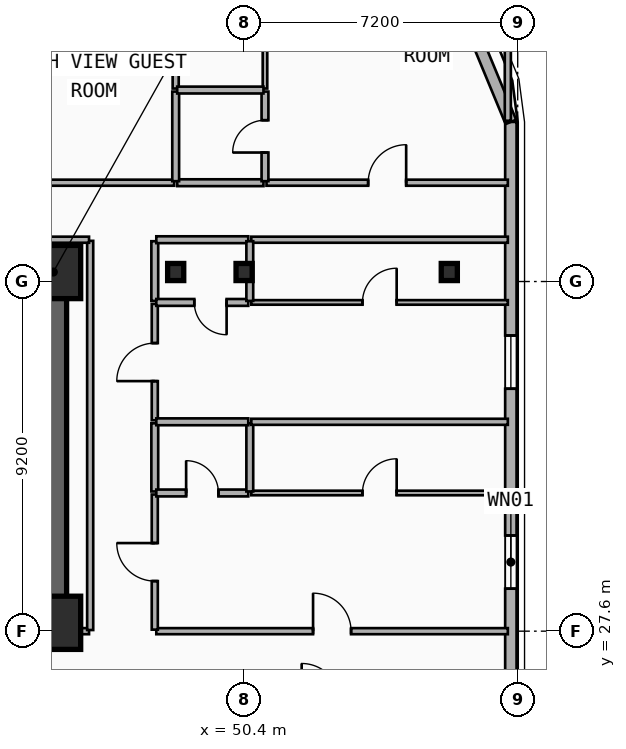
"""IFC4 building model, lengths in metres.
Left out: names, types, materials, properties, quantities, classifications, styles, units other than length and angle.
Written with IfcOpenShell. Run it as: python <this file> out.ifc"""

import sys

from ifc_helpers import new_model, si_unit, direction, frame, frame_2d, origin, origin_2d, place, context, subcontext, project, spatial, rectangle, i_section, extrude, element, fill, save


model = new_model("IFC4")
c1 = context("Model", 3, precision=1e-05, world=origin(), true_north=direction((0.0, 1.0)))
c2 = subcontext(c1, "Body", "Model", "MODEL_VIEW")
j1 = project(units=[si_unit("LENGTHUNIT", "METRE"), si_unit("PLANEANGLEUNIT", "RADIAN")], contexts=[c1])
p1 = place(None, origin())
s1 = spatial("IfcSite", under=j1, at=p1, CompositionType="ELEMENT")
p2 = place(p1, origin())
s2 = spatial("IfcBuilding", under=s1, at=p2, CompositionType="ELEMENT")
p3 = place(p2, frame((0.0, 0.0, 53.5)))
s3 = spatial("IfcBuildingStorey", under=s2, at=p3, CompositionType="ELEMENT", Elevation=53.5)
p4 = place(p3, frame((12.15, 37.05, 0.0), z_axis=(0.0, 0.0, 1.0), x_axis=(1.0, 0.0, 0.0)))
e1 = element("IfcWall", 1, at=p4, inside=s3, PredefinedType="SHEAR", context=c2, shape_type="SweptSolid", body=[
    extrude(rectangle(XDim=33.23, YDim=0.7, at=frame_2d((16.615, 0.0))), origin(), (0.0, 0.0, 1.0), 3.5),
])
p5 = place(p3, frame((45.38, 27.82, 0.0), z_axis=(0.0, 0.0, 1.0), x_axis=(-1.0, 0.0, 0.0)))
e2 = element("IfcWall", 2, at=p5, inside=s3, PredefinedType="SHEAR", context=c2, shape_type="SweptSolid", body=[
    extrude(rectangle(XDim=12.23, YDim=0.7, at=frame_2d((6.115, 0.0))), origin(), (0.0, 0.0, 1.0), 3.5),
])
p6 = place(p5, frame((9.93, 0.0, 0.0)))
e3 = element("IfcOpeningElement", 3, at=p6, cuts=e2, PredefinedType="OPENING", context=c2, shape_type="SweptSolid", body=[
    extrude(rectangle(XDim=1.1, YDim=2.15, at=frame_2d((0.55, 1.075))), frame((0.0, 0.36, 0.0), z_axis=(0.0, -1.0, 0.0), x_axis=(1.0, 0.0, 0.0)), (0.0, 0.0, 1.0), 0.72),
])
p7 = place(p5, frame((6.23, 0.0, 0.0)))
e4 = element("IfcOpeningElement", 4, at=p7, cuts=e2, PredefinedType="OPENING", context=c2, shape_type="SweptSolid", body=[
    extrude(rectangle(XDim=1.1, YDim=2.15, at=frame_2d((0.55, 1.075))), frame((0.0, 0.36, 0.0), z_axis=(0.0, -1.0, 0.0), x_axis=(1.0, 0.0, 0.0)), (0.0, 0.0, 1.0), 0.72),
])
p8 = place(p3, frame((45.38, 28.17, 0.0), z_axis=(0.0, 0.0, 1.0), x_axis=(0.0, 1.0, 0.0)))
e5 = element("IfcWall", 5, at=p8, inside=s3, PredefinedType="SHEAR", context=c2, shape_type="SweptSolid", body=[
    extrude(rectangle(XDim=8.53, YDim=0.7, at=frame_2d((4.265, 0.0))), origin(), (0.0, 0.0, 1.0), 3.5),
])
for number, where, z_axis, x_axis in (
    (6, (45.4, 27.82, 0.0), (0.0, 0.0, 1.0), (1.0, 0.0, 0.0)),
    (7, (45.4, 37.05, 0.0), (0.0, 0.0, 1.0), (1.0, 0.0, 0.0)),
):
    element("IfcColumn", number, at=place(p3, frame(where, z_axis=z_axis, x_axis=x_axis)), inside=s3, PredefinedType="COLUMN", context=c2, shape_type="SweptSolid", body=[
        extrude(rectangle(XDim=1.4, YDim=1.4, at=origin_2d()), origin(), (0.0, 0.0, 1.0), 3.5),
    ])
for number, where, z_axis, x_axis in (
    (8, (48.6, 37.05, 0.0), (0.0, 0.0, 1.0), (1.0, 0.0, 0.0)),
    (9, (50.4, 37.05, 0.0), (0.0, 0.0, 1.0), (1.0, 0.0, 0.0)),
    (10, (55.8, 37.05, 0.0), (0.0, 0.0, 1.0), (1.0, 0.0, 0.0)),
):
    element("IfcColumn", number, at=place(p3, frame(where, z_axis=z_axis, x_axis=x_axis)), inside=s3, PredefinedType="COLUMN", context=c2, shape_type="SweptSolid", body=[
        extrude(i_section(OverallWidth=0.424, OverallDepth=0.45, WebThickness=0.041, FlangeThickness=0.065, FilletRadius=0.015, at=origin_2d()), origin(), (0.0, 0.0, 1.0), 3.5),
    ])
p9 = place(p3, frame((57.42, 41.0, 0.0), z_axis=(0.0, 0.0, 1.0), x_axis=(0.0, -1.0, 0.0)))
e11 = element("IfcWall", 11, at=p9, inside=s3, PredefinedType="SOLIDWALL", context=c2, shape_type="SweptSolid", body=[
    extrude(rectangle(XDim=15.2, YDim=0.3, at=frame_2d((7.6, 0.0))), origin(), (0.0, 0.0, 1.0), 3.24),
])
p10 = place(p9, frame((10.882, 0.0, 0.48)))
e12 = element("IfcOpeningElement", 12, at=p10, cuts=e11, PredefinedType="OPENING", context=c2, shape_type="SweptSolid", body=[
    extrude(rectangle(XDim=1.4, YDim=1.8, at=frame_2d((0.7, 0.9))), frame((0.0, 0.16, 0.0), z_axis=(0.0, -1.0, 0.0), x_axis=(1.0, 0.0, 0.0)), (0.0, 0.0, 1.0), 0.32),
])
p11 = place(p9, frame((5.621, 0.0, 0.48)))
e13 = element("IfcOpeningElement", 13, at=p11, cuts=e11, PredefinedType="OPENING", context=c2, shape_type="SweptSolid", body=[
    extrude(rectangle(XDim=1.4, YDim=1.8, at=frame_2d((0.7, 0.9))), frame((0.0, 0.16, 0.0), z_axis=(0.0, -1.0, 0.0), x_axis=(1.0, 0.0, 0.0)), (0.0, 0.0, 1.0), 0.32),
])
p12 = place(p3, frame((56.243, 43.843, 0.0), z_axis=(0.0, 0.0, 1.0), x_axis=(0.382636798336, -0.92389884758, 0.0)))
e14 = element("IfcWall", 14, at=p12, inside=s3, PredefinedType="SOLIDWALL", context=c2, shape_type="SweptSolid", body=[
    extrude(rectangle(XDim=3.077, YDim=0.3, at=frame_2d((1.538, 0.0))), origin(), (0.0, 0.0, 1.0), 3.24),
])
p13 = place(p3, frame((48.09, 27.6, 0.0), z_axis=(0.0, 0.0, 1.0), x_axis=(1.0, 0.0, 0.0)))
e15 = element("IfcWall", 15, at=p13, inside=s3, PredefinedType="PARTITIONING", context=c2, shape_type="SweptSolid", body=[
    extrude(rectangle(XDim=9.25, YDim=0.16, at=frame_2d((4.625, 0.0))), origin(), (0.0, 0.0, 1.0), 2.57),
])
p14 = place(p13, frame((4.125, 0.0, 0.0)))
e16 = element("IfcOpeningElement", 16, at=p14, cuts=e15, PredefinedType="OPENING", context=c2, shape_type="SweptSolid", body=[
    extrude(rectangle(XDim=1.0, YDim=2.15, at=frame_2d((0.5, 1.075))), frame((0.0, 0.09, 0.0), z_axis=(0.0, -1.0, 0.0), x_axis=(1.0, 0.0, 0.0)), (0.0, 0.0, 1.0), 0.18),
])
p15 = place(p3, frame((48.05, 27.64, 0.0), z_axis=(0.0, 0.0, 1.0), x_axis=(0.0, 1.0, 0.0)))
e17 = element("IfcWall", 17, at=p15, inside=s3, PredefinedType="PARTITIONING", context=c2, shape_type="SweptSolid", body=[
    extrude(rectangle(XDim=3.556, YDim=0.16, at=frame_2d((1.778, 0.0))), origin(), (0.0, 0.0, 1.0), 3.24),
])
p16 = place(p15, frame((1.278, 0.0, 0.0)))
e18 = element("IfcOpeningElement", 18, at=p16, cuts=e17, PredefinedType="OPENING", context=c2, shape_type="SweptSolid", body=[
    extrude(rectangle(XDim=1.0, YDim=2.15, at=frame_2d((0.5, 1.075))), frame((0.0, 0.09, 0.0), z_axis=(0.0, -1.0, 0.0), x_axis=(1.0, 0.0, 0.0)), (0.0, 0.0, 1.0), 0.18),
])
p17 = place(p3, frame((48.05, 31.276, 0.0), z_axis=(0.0, 0.0, 1.0), x_axis=(0.0, 1.0, 0.0)))
e19 = element("IfcWall", 19, at=p17, inside=s3, PredefinedType="PLUMBINGWALL", context=c2, shape_type="SweptSolid", body=[
    extrude(rectangle(XDim=1.793, YDim=0.18, at=frame_2d((0.896, 0.0))), origin(), (0.0, 0.0, 1.0), 3.24),
])
p18 = place(p3, frame((48.05, 33.149, 0.0), z_axis=(0.0, 0.0, 1.0), x_axis=(0.0, 1.0, 0.0)))
e20 = element("IfcWall", 20, at=p18, inside=s3, PredefinedType="PARTITIONING", context=c2, shape_type="SweptSolid", body=[
    extrude(rectangle(XDim=3.061, YDim=0.16, at=frame_2d((1.531, 0.0))), origin(), (0.0, 0.0, 1.0), 3.24),
])
p19 = place(p18, frame((1.031, 0.0, 0.0)))
e21 = element("IfcOpeningElement", 21, at=p19, cuts=e20, PredefinedType="OPENING", context=c2, shape_type="SweptSolid", body=[
    extrude(rectangle(XDim=1.0, YDim=2.15, at=frame_2d((0.5, 1.075))), frame((0.0, 0.09, 0.0), z_axis=(0.0, -1.0, 0.0), x_axis=(1.0, 0.0, 0.0)), (0.0, 0.0, 1.0), 0.18),
])
p20 = place(p3, frame((48.05, 36.29, 0.0), z_axis=(0.0, 0.0, 1.0), x_axis=(0.0, 1.0, 0.0)))
e22 = element("IfcWall", 22, at=p20, inside=s3, PredefinedType="PLUMBINGWALL", context=c2, shape_type="SweptSolid", body=[
    extrude(rectangle(XDim=1.57, YDim=0.18, at=frame_2d((0.785, 0.0))), origin(), (0.0, 0.0, 1.0), 2.72),
])
p21 = place(p3, frame((48.09, 37.9, 0.0), z_axis=(0.0, 0.0, 1.0), x_axis=(1.0, 0.0, 0.0)))
e23 = element("IfcWall", 23, at=p21, inside=s3, PredefinedType="PLUMBINGWALL", context=c2, shape_type="SweptSolid", body=[
    extrude(rectangle(XDim=2.42, YDim=0.18, at=frame_2d((1.21, 0.0))), origin(), (0.0, 0.0, 1.0), 3.24),
])
p22 = place(p3, frame((50.59, 37.9, 0.0), z_axis=(0.0, 0.0, 1.0), x_axis=(1.0, 0.0, 0.0)))
e24 = element("IfcWall", 24, at=p22, inside=s3, PredefinedType="PARTITIONING", context=c2, shape_type="SweptSolid", body=[
    extrude(rectangle(XDim=6.75, YDim=0.16, at=frame_2d((3.375, 0.0))), origin(), (0.0, 0.0, 1.0), 3.24),
])
p23 = place(p3, frame((35.737, 39.4, 0.0), z_axis=(0.0, 0.0, 1.0), x_axis=(1.0, 0.0, 0.0)))
e25 = element("IfcWall", 25, at=p23, inside=s3, PredefinedType="PARTITIONING", context=c2, shape_type="SweptSolid", body=[
    extrude(rectangle(XDim=12.823, YDim=0.16, at=frame_2d((6.412, 0.0))), origin(), (0.0, 0.0, 1.0), 3.24),
])
p24 = place(p23, frame((5.912, 0.0, 0.0)))
e26 = element("IfcOpeningElement", 26, at=p24, cuts=e25, PredefinedType="OPENING", context=c2, shape_type="SweptSolid", body=[
    extrude(rectangle(XDim=1.0, YDim=2.15, at=frame_2d((0.5, 1.075))), frame((0.0, 0.09, 0.0), z_axis=(0.0, -1.0, 0.0), x_axis=(1.0, 0.0, 0.0)), (0.0, 0.0, 1.0), 0.18),
])
p25 = place(p3, frame((50.99, 39.4, 0.0), z_axis=(0.0, 0.0, 1.0), x_axis=(1.0, 0.0, 0.0)))
e27 = element("IfcWall", 27, at=p25, inside=s3, PredefinedType="PARTITIONING", context=c2, shape_type="SweptSolid", body=[
    extrude(rectangle(XDim=6.35, YDim=0.16, at=frame_2d((3.175, 0.0))), origin(), (0.0, 0.0, 1.0), 3.24),
])
p26 = place(p25, frame((2.675, 0.0, 0.0)))
e28 = element("IfcOpeningElement", 28, at=p26, cuts=e27, PredefinedType="OPENING", context=c2, shape_type="SweptSolid", body=[
    extrude(rectangle(XDim=1.0, YDim=2.15, at=frame_2d((0.5, 1.075))), frame((0.0, 0.09, 0.0), z_axis=(0.0, -1.0, 0.0), x_axis=(1.0, 0.0, 0.0)), (0.0, 0.0, 1.0), 0.18),
])
p27 = place(p3, frame((48.64, 39.4, 0.0), z_axis=(0.0, 0.0, 1.0), x_axis=(1.0, 0.0, 0.0)))
e29 = element("IfcWall", 29, at=p27, inside=s3, PredefinedType="PLUMBINGWALL", context=c2, shape_type="SweptSolid", body=[
    extrude(rectangle(XDim=2.27, YDim=0.18, at=frame_2d((1.135, 0.0))), origin(), (0.0, 0.0, 1.0), 3.24),
])
p28 = place(p3, frame((48.09, 31.236, 0.0), z_axis=(0.0, 0.0, 1.0), x_axis=(1.0, 0.0, 0.0)))
e30 = element("IfcWall", 30, at=p28, inside=s3, PredefinedType="PLUMBINGWALL", context=c2, shape_type="SweptSolid", body=[
    extrude(rectangle(XDim=2.42, YDim=0.18, at=frame_2d((1.21, 0.0))), origin(), (0.0, 0.0, 1.0), 2.57),
])
p29 = place(p28, frame((0.785, 0.0, 0.0)))
e31 = element("IfcOpeningElement", 31, at=p29, cuts=e30, PredefinedType="OPENING", context=c2, shape_type="SweptSolid", body=[
    extrude(rectangle(XDim=0.85, YDim=2.1, at=frame_2d((0.425, 1.05))), frame((0.0, 0.1, 0.0), z_axis=(0.0, -1.0, 0.0), x_axis=(1.0, 0.0, 0.0)), (0.0, 0.0, 1.0), 0.2),
])
p30 = place(p3, frame((50.59, 31.236, 0.0), z_axis=(0.0, 0.0, 1.0), x_axis=(1.0, 0.0, 0.0)))
e32 = element("IfcWall", 32, at=p30, inside=s3, PredefinedType="PARTITIONING", context=c2, shape_type="SweptSolid", body=[
    extrude(rectangle(XDim=6.75, YDim=0.12, at=frame_2d((3.375, 0.0))), origin(), (0.0, 0.0, 1.0), 2.57),
])
p31 = place(p30, frame((2.925, 0.0, 0.0)))
e33 = element("IfcOpeningElement", 33, at=p31, cuts=e32, PredefinedType="OPENING", context=c2, shape_type="SweptSolid", body=[
    extrude(rectangle(XDim=0.9, YDim=2.1, at=frame_2d((0.45, 1.05))), frame((0.0, 0.07, 0.0), z_axis=(0.0, -1.0, 0.0), x_axis=(1.0, 0.0, 0.0)), (0.0, 0.0, 1.0), 0.14),
])
p32 = place(p3, frame((50.55, 31.276, 0.0), z_axis=(0.0, 0.0, 1.0), x_axis=(0.0, 1.0, 0.0)))
e34 = element("IfcWall", 34, at=p32, inside=s3, PredefinedType="PLUMBINGWALL", context=c2, shape_type="SweptSolid", body=[
    extrude(rectangle(XDim=1.793, YDim=0.18, at=frame_2d((0.896, 0.0))), origin(), (0.0, 0.0, 1.0), 2.57),
])
p33 = place(p3, frame((48.09, 33.109, 0.0), z_axis=(0.0, 0.0, 1.0), x_axis=(1.0, 0.0, 0.0)))
e35 = element("IfcWall", 35, at=p33, inside=s3, PredefinedType="PLUMBINGWALL", context=c2, shape_type="SweptSolid", body=[
    extrude(rectangle(XDim=2.42, YDim=0.18, at=frame_2d((1.21, 0.0))), origin(), (0.0, 0.0, 1.0), 2.57),
])
p34 = place(p3, frame((50.59, 33.109, 0.0), z_axis=(0.0, 0.0, 1.0), x_axis=(1.0, 0.0, 0.0)))
e36 = element("IfcWall", 36, at=p34, inside=s3, PredefinedType="PARTITIONING", context=c2, shape_type="SweptSolid", body=[
    extrude(rectangle(XDim=6.75, YDim=0.16, at=frame_2d((3.375, 0.0))), origin(), (0.0, 0.0, 1.0), 2.57),
])
p35 = place(p3, frame((50.51, 36.25, 0.0), z_axis=(0.0, 0.0, 1.0), x_axis=(-1.0, 0.0, 0.0)))
e37 = element("IfcWall", 37, at=p35, inside=s3, PredefinedType="PLUMBINGWALL", context=c2, shape_type="SweptSolid", body=[
    extrude(rectangle(XDim=2.42, YDim=0.18, at=frame_2d((1.21, 0.0))), origin(), (0.0, 0.0, 1.0), 2.57),
])
p36 = place(p35, frame((0.57, 0.0, 0.0)))
e38 = element("IfcOpeningElement", 38, at=p36, cuts=e37, PredefinedType="OPENING", context=c2, shape_type="SweptSolid", body=[
    extrude(rectangle(XDim=0.85, YDim=2.1, at=frame_2d((0.425, 1.05))), frame((0.0, 0.1, 0.0), z_axis=(0.0, -1.0, 0.0), x_axis=(1.0, 0.0, 0.0)), (0.0, 0.0, 1.0), 0.2),
])
p37 = place(p3, frame((50.59, 36.25, 0.0), z_axis=(0.0, 0.0, 1.0), x_axis=(1.0, 0.0, 0.0)))
e39 = element("IfcWall", 39, at=p37, inside=s3, PredefinedType="PARTITIONING", context=c2, shape_type="SweptSolid", body=[
    extrude(rectangle(XDim=6.75, YDim=0.12, at=frame_2d((3.375, 0.0))), origin(), (0.0, 0.0, 1.0), 2.57),
])
p38 = place(p37, frame((2.925, 0.0, 0.0)))
e40 = element("IfcOpeningElement", 40, at=p38, cuts=e39, PredefinedType="OPENING", context=c2, shape_type="SweptSolid", body=[
    extrude(rectangle(XDim=0.9, YDim=2.1, at=frame_2d((0.45, 1.05))), frame((0.0, 0.07, 0.0), z_axis=(0.0, -1.0, 0.0), x_axis=(1.0, 0.0, 0.0)), (0.0, 0.0, 1.0), 0.14),
])
p39 = place(p3, frame((50.55, 36.29, 0.0), z_axis=(0.0, 0.0, 1.0), x_axis=(0.0, 1.0, 0.0)))
e41 = element("IfcWall", 41, at=p39, inside=s3, PredefinedType="PLUMBINGWALL", context=c2, shape_type="SweptSolid", body=[
    extrude(rectangle(XDim=1.57, YDim=0.18, at=frame_2d((0.785, 0.0))), origin(), (0.0, 0.0, 1.0), 2.57),
])
p40 = place(p3, frame((48.6, 39.44, 0.0), z_axis=(0.0, 0.0, 1.0), x_axis=(0.0, 1.0, 0.0)))
e42 = element("IfcWall", 42, at=p40, inside=s3, PredefinedType="PLUMBINGWALL", context=c2, shape_type="SweptSolid", body=[
    extrude(rectangle(XDim=2.358, YDim=0.18, at=frame_2d((1.179, 0.0))), origin(), (0.0, 0.0, 1.0), 3.24),
])
p41 = place(p3, frame((48.6, 41.878, 0.0), z_axis=(0.0, 0.0, 1.0), x_axis=(0.0, 1.0, 0.0)))
e43 = element("IfcWall", 43, at=p41, inside=s3, PredefinedType="PARTITIONING", context=c2, shape_type="SweptSolid", body=[
    extrude(rectangle(XDim=3.062, YDim=0.16, at=frame_2d((1.531, 0.0))), origin(), (0.0, 0.0, 1.0), 3.24),
])
p42 = place(p3, frame((50.95, 39.44, 0.0), z_axis=(0.0, 0.0, 1.0), x_axis=(0.0, 1.0, 0.0)))
e44 = element("IfcWall", 44, at=p42, inside=s3, PredefinedType="PLUMBINGWALL", context=c2, shape_type="SweptSolid", body=[
    extrude(rectangle(XDim=2.358, YDim=0.18, at=frame_2d((1.179, 0.0))), origin(), (0.0, 0.0, 1.0), 3.24),
])
p43 = place(p42, frame((0.754, 0.0, 0.0)))
e45 = element("IfcOpeningElement", 45, at=p43, cuts=e44, PredefinedType="OPENING", context=c2, shape_type="SweptSolid", body=[
    extrude(rectangle(XDim=0.85, YDim=2.1, at=frame_2d((0.425, 1.05))), frame((0.0, 0.1, 0.0), z_axis=(0.0, -1.0, 0.0), x_axis=(1.0, 0.0, 0.0)), (0.0, 0.0, 1.0), 0.2),
])
p44 = place(p3, frame((50.95, 41.878, 0.0), z_axis=(0.0, 0.0, 1.0), x_axis=(0.0, 1.0, 0.0)))
e46 = element("IfcWall", 46, at=p44, inside=s3, PredefinedType="PARTITIONING", context=c2, shape_type="SweptSolid", body=[
    extrude(rectangle(XDim=3.062, YDim=0.12, at=frame_2d((1.531, 0.0))), origin(), (0.0, 0.0, 1.0), 3.24),
])
p45 = place(p44, frame((1.081, 0.0, 0.0)))
e47 = element("IfcOpeningElement", 47, at=p45, cuts=e46, PredefinedType="OPENING", context=c2, shape_type="SweptSolid", body=[
    extrude(rectangle(XDim=0.9, YDim=2.1, at=frame_2d((0.45, 1.05))), frame((0.0, 0.07, 0.0), z_axis=(0.0, -1.0, 0.0), x_axis=(1.0, 0.0, 0.0)), (0.0, 0.0, 1.0), 0.14),
])
p46 = place(p3, frame((48.64, 41.838, 0.0), z_axis=(0.0, 0.0, 1.0), x_axis=(1.0, 0.0, 0.0)))
e48 = element("IfcWall", 48, at=p46, inside=s3, PredefinedType="PLUMBINGWALL", context=c2, shape_type="SweptSolid", body=[
    extrude(rectangle(XDim=2.27, YDim=0.18, at=frame_2d((1.135, 0.0))), origin(), (0.0, 0.0, 1.0), 3.24),
])
p47 = place(p3, frame((45.41, 27.6, 0.0), z_axis=(0.0, 0.0, 1.0), x_axis=(1.0, 0.0, 0.0)))
e49 = element("IfcWall", 49, at=p47, inside=s3, PredefinedType="PARTITIONING", context=c2, shape_type="SweptSolid", body=[
    extrude(rectangle(XDim=0.91, YDim=0.16, at=frame_2d((0.455, 0.0))), origin(), (0.0, 0.0, 1.0), 2.28),
])
p48 = place(p3, frame((46.35, 27.63, 0.0), z_axis=(0.0, 0.0, 1.0), x_axis=(0.0, 1.0, 0.0)))
e50 = element("IfcWall", 50, at=p48, inside=s3, PredefinedType="PARTITIONING", context=c2, shape_type="SweptSolid", body=[
    extrude(rectangle(XDim=10.24, YDim=0.16, at=frame_2d((5.12, 0.0))), origin(), (0.0, 0.0, 1.0), 2.72),
])
p49 = place(p3, frame((11.28, 37.9, 0.0), z_axis=(0.0, 0.0, 1.0), x_axis=(1.0, 0.0, 0.0)))
e51 = element("IfcWall", 51, at=p49, inside=s3, PredefinedType="PARTITIONING", context=c2, shape_type="SweptSolid", body=[
    extrude(rectangle(XDim=35.04, YDim=0.16, at=frame_2d((17.52, 0.0))), origin(), (0.0, 0.0, 1.0), 3.24),
])
p50 = place(p3, frame((57.34, 41.03, 0.0), z_axis=(0.0, 0.0, 1.0), x_axis=(0.0, 1.0, 0.0)))
e52 = element("IfcWall", 52, at=p50, inside=s3, PredefinedType="PARTITIONING", context=c2, shape_type="SweptSolid", body=[
    extrude(rectangle(XDim=3.88, YDim=0.16, at=frame_2d((1.94, 0.0))), origin(), (0.0, 0.0, 1.0), 3.24),
])
p51 = place(p10, origin())
e53 = element("IfcWindow", 53, at=p51, inside=s3, PartitioningType="SINGLE_PANEL", PredefinedType="WINDOW", context=c2, shape_type="SweptSolid", body=[
    extrude(rectangle(XDim=1.4, YDim=1.8, at=frame_2d((0.7, 0.9))), frame((0.0, 0.03, 0.0), z_axis=(0.0, -1.0, 0.0), x_axis=(1.0, 0.0, 0.0)), (0.0, 0.0, 1.0), 0.06),
])
fill(e12, e53)
p52 = place(p11, origin())
e54 = element("IfcWindow", 54, at=p52, inside=s3, PartitioningType="SINGLE_PANEL", PredefinedType="WINDOW", context=c2, shape_type="SweptSolid", body=[
    extrude(rectangle(XDim=1.4, YDim=1.8, at=frame_2d((0.7, 0.9))), frame((0.0, 0.03, 0.0), z_axis=(0.0, -1.0, 0.0), x_axis=(1.0, 0.0, 0.0)), (0.0, 0.0, 1.0), 0.06),
])
fill(e13, e54)
p53 = place(p14, origin())
e55 = element("IfcDoor", 55, at=p53, inside=s3, OperationType="SINGLE_SWING_LEFT", PredefinedType="DOOR", context=c2, shape_type="SweptSolid", body=[
    extrude(rectangle(XDim=1.0, YDim=2.15, at=frame_2d((0.5, 1.075))), frame((0.0, 0.025, 0.0), z_axis=(0.0, -1.0, 0.0), x_axis=(1.0, 0.0, 0.0)), (0.0, 0.0, 1.0), 0.05),
])
fill(e16, e55)
p54 = place(p16, origin())
e56 = element("IfcDoor", 56, at=p54, inside=s3, OperationType="SINGLE_SWING_RIGHT", PredefinedType="DOOR", context=c2, shape_type="SweptSolid", body=[
    extrude(rectangle(XDim=1.0, YDim=2.15, at=frame_2d((0.5, 1.075))), frame((0.0, 0.025, 0.0), z_axis=(0.0, -1.0, 0.0), x_axis=(1.0, 0.0, 0.0)), (0.0, 0.0, 1.0), 0.05),
])
fill(e18, e56)
p55 = place(p19, origin())
e57 = element("IfcDoor", 57, at=p55, inside=s3, OperationType="SINGLE_SWING_LEFT", PredefinedType="DOOR", context=c2, shape_type="SweptSolid", body=[
    extrude(rectangle(XDim=1.0, YDim=2.15, at=frame_2d((0.5, 1.075))), frame((0.0, 0.025, 0.0), z_axis=(0.0, -1.0, 0.0), x_axis=(1.0, 0.0, 0.0)), (0.0, 0.0, 1.0), 0.05),
])
fill(e21, e57)
p56 = place(p26, origin())
e58 = element("IfcDoor", 58, at=p56, inside=s3, OperationType="SINGLE_SWING_RIGHT", PredefinedType="DOOR", context=c2, shape_type="SweptSolid", body=[
    extrude(rectangle(XDim=1.0, YDim=2.15, at=frame_2d((0.5, 1.075))), frame((0.0, 0.025, 0.0), z_axis=(0.0, -1.0, 0.0), x_axis=(1.0, 0.0, 0.0)), (0.0, 0.0, 1.0), 0.05),
])
fill(e28, e58)
p57 = place(p29, origin())
e59 = element("IfcDoor", 59, at=p57, inside=s3, OperationType="SINGLE_SWING_LEFT", PredefinedType="DOOR", context=c2, shape_type="SweptSolid", body=[
    extrude(rectangle(XDim=0.85, YDim=2.1, at=frame_2d((0.425, 1.05))), frame((0.0, 0.025, 0.0), z_axis=(0.0, -1.0, 0.0), x_axis=(1.0, 0.0, 0.0)), (0.0, 0.0, 1.0), 0.05),
])
fill(e31, e59)
p58 = place(p31, origin())
e60 = element("IfcDoor", 60, at=p58, inside=s3, OperationType="SINGLE_SWING_RIGHT", PredefinedType="DOOR", context=c2, shape_type="SweptSolid", body=[
    extrude(rectangle(XDim=0.9, YDim=2.1, at=frame_2d((0.45, 1.05))), frame((0.0, 0.025, 0.0), z_axis=(0.0, -1.0, 0.0), x_axis=(1.0, 0.0, 0.0)), (0.0, 0.0, 1.0), 0.05),
])
fill(e33, e60)
p59 = place(p36, origin())
e61 = element("IfcDoor", 61, at=p59, inside=s3, OperationType="SINGLE_SWING_LEFT", PredefinedType="DOOR", context=c2, shape_type="SweptSolid", body=[
    extrude(rectangle(XDim=0.85, YDim=2.1, at=frame_2d((0.425, 1.05))), frame((0.0, 0.025, 0.0), z_axis=(0.0, -1.0, 0.0), x_axis=(1.0, 0.0, 0.0)), (0.0, 0.0, 1.0), 0.05),
])
fill(e38, e61)
p60 = place(p38, origin())
e62 = element("IfcDoor", 62, at=p60, inside=s3, OperationType="SINGLE_SWING_RIGHT", PredefinedType="DOOR", context=c2, shape_type="SweptSolid", body=[
    extrude(rectangle(XDim=0.9, YDim=2.1, at=frame_2d((0.45, 1.05))), frame((0.0, 0.025, 0.0), z_axis=(0.0, -1.0, 0.0), x_axis=(1.0, 0.0, 0.0)), (0.0, 0.0, 1.0), 0.05),
])
fill(e40, e62)
p61 = place(p43, origin())
e63 = element("IfcDoor", 63, at=p61, inside=s3, OperationType="SINGLE_SWING_LEFT", PredefinedType="DOOR", context=c2, shape_type="SweptSolid", body=[
    extrude(rectangle(XDim=0.85, YDim=2.1, at=frame_2d((0.425, 1.05))), frame((0.0, 0.025, 0.0), z_axis=(0.0, -1.0, 0.0), x_axis=(1.0, 0.0, 0.0)), (0.0, 0.0, 1.0), 0.05),
])
fill(e45, e63)
save(model, sys.argv[1])
